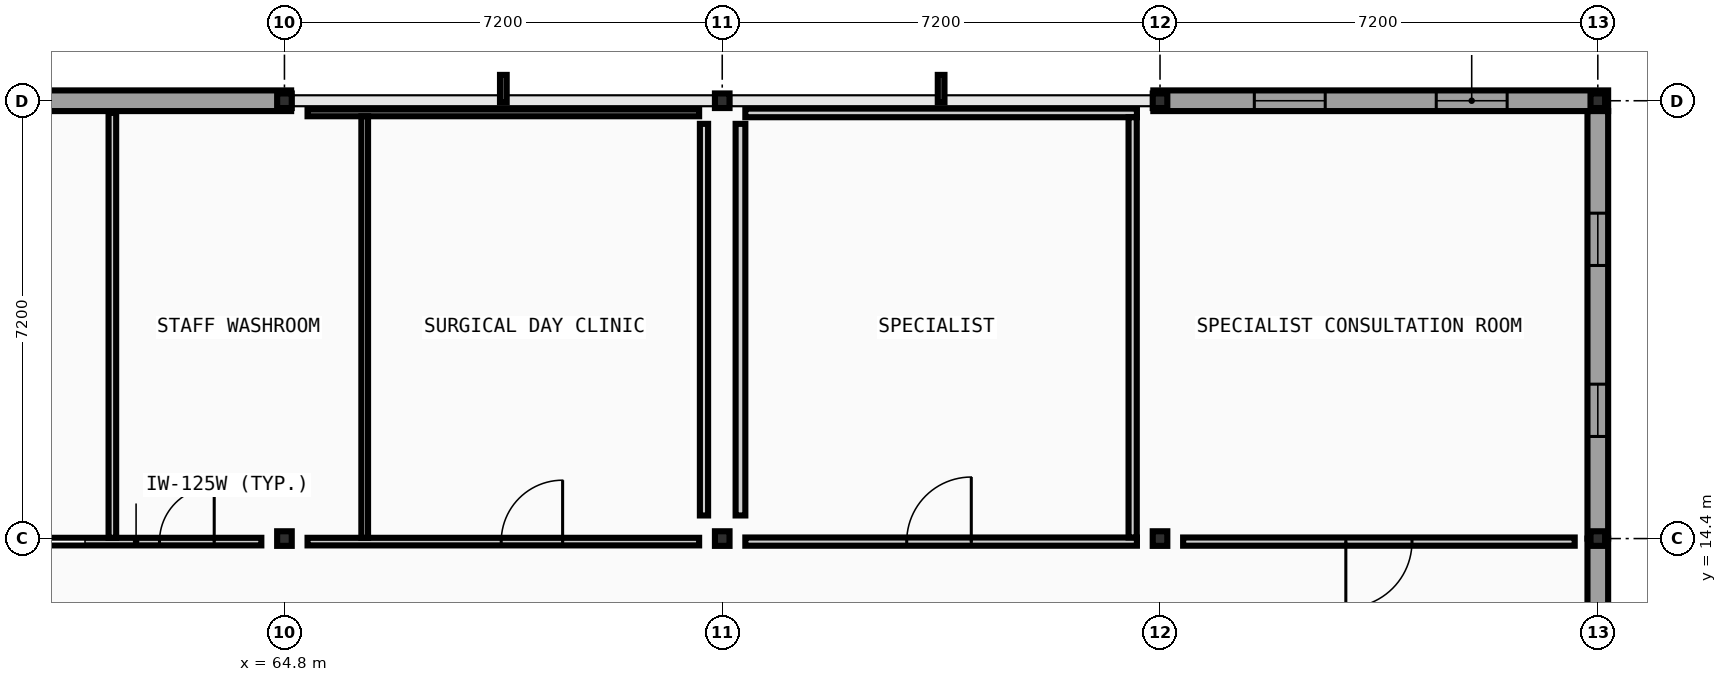
"""IFC4 building model, lengths in metres.
Left out: names, types, materials, properties, quantities, classifications, styles, units other than length and angle.
Written with IfcOpenShell. Run it as: python <this file> out.ifc"""

import sys

from ifc_helpers import new_model, si_unit, direction, frame, frame_2d, origin, origin_2d, place, context, subcontext, project, spatial, rectangle, i_section, extrude, element, fill, save


model = new_model("IFC4")
c1 = context("Model", 3, precision=1e-05, world=origin(), true_north=direction((0.0, 1.0)))
c2 = subcontext(c1, "Body", "Model", "MODEL_VIEW")
j1 = project(units=[si_unit("LENGTHUNIT", "METRE"), si_unit("PLANEANGLEUNIT", "RADIAN")], contexts=[c1])
p1 = place(None, origin())
s1 = spatial("IfcSite", under=j1, at=p1, CompositionType="ELEMENT")
p2 = place(p1, origin())
s2 = spatial("IfcBuilding", under=s1, at=p2, CompositionType="ELEMENT")
p3 = place(p2, frame((0.0, 0.0, 18.4)))
s3 = spatial("IfcBuildingStorey", under=s2, at=p3, CompositionType="ELEMENT", Elevation=18.4)
for number, where, z_axis, x_axis in (
    (1, (64.8, 14.4, 0.0), (0.0, 0.0, 1.0), (1.0, 0.0, 0.0)),
    (2, (64.8, 21.6, 0.0), (0.0, 0.0, 1.0), (1.0, 0.0, 0.0)),
    (3, (72.0, 14.4, 0.0), (0.0, 0.0, 1.0), (1.0, 0.0, 0.0)),
    (4, (72.0, 21.6, 0.0), (0.0, 0.0, 1.0), (1.0, 0.0, 0.0)),
    (5, (79.2, 14.4, 0.0), (0.0, 0.0, 1.0), (1.0, 0.0, 0.0)),
    (6, (79.2, 21.6, 0.0), (0.0, 0.0, 1.0), (1.0, 0.0, 0.0)),
    (7, (86.4, 14.4, 0.0), (0.0, 0.0, 1.0), (1.0, 0.0, 0.0)),
    (8, (86.4, 21.6, 0.0), (0.0, 0.0, 1.0), (1.0, 0.0, 0.0)),
):
    element("IfcColumn", number, at=place(p3, frame(where, z_axis=z_axis, x_axis=x_axis)), inside=s3, PredefinedType="COLUMN", context=c2, shape_type="SweptSolid", body=[
        extrude(i_section(OverallWidth=0.24, OverallDepth=0.24, WebThickness=0.01, FlangeThickness=0.017, FilletRadius=0.021, at=origin_2d()), origin(), (0.0, 0.0, 1.0), 4.4),
    ])
p4 = place(p3, frame((64.91, 21.6, 0.0), z_axis=(0.0, 0.0, 1.0), x_axis=(-1.0, 0.0, 0.0)))
e9 = element("IfcWall", 9, at=p4, inside=s3, PredefinedType="STANDARD", context=c2, shape_type="SweptSolid", body=[
    extrude(rectangle(XDim=6.42, YDim=0.34, at=frame_2d((3.21, 0.0))), origin(), (0.0, 0.0, 1.0), 4.035),
])
p5 = place(p3, frame((86.57, 21.6, 0.0), z_axis=(0.0, 0.0, 1.0), x_axis=(-1.0, 0.0, 0.0)))
e10 = element("IfcWall", 10, at=p5, inside=s3, PredefinedType="STANDARD", context=c2, shape_type="SweptSolid", body=[
    extrude(rectangle(XDim=7.48, YDim=0.34, at=frame_2d((3.74, 0.0))), origin(), (0.0, 0.0, 1.0), 4.035),
])
p6 = place(p5, frame((1.661, 0.0, 0.95)))
e11 = element("IfcOpeningElement", 11, at=p6, cuts=e10, PredefinedType="OPENING", context=c2, shape_type="SweptSolid", body=[
    extrude(rectangle(XDim=1.166, YDim=1.368, at=frame_2d((0.583, 0.684))), frame((0.0, 0.18, 0.0), z_axis=(0.0, -1.0, 0.0), x_axis=(1.0, 0.0, 0.0)), (0.0, 0.0, 1.0), 0.36),
])
p7 = place(p5, frame((4.653, 0.0, 0.95)))
e12 = element("IfcOpeningElement", 12, at=p7, cuts=e10, PredefinedType="OPENING", context=c2, shape_type="SweptSolid", body=[
    extrude(rectangle(XDim=1.166, YDim=1.368, at=frame_2d((0.583, 0.684))), frame((0.0, 0.18, 0.0), z_axis=(0.0, -1.0, 0.0), x_axis=(1.0, 0.0, 0.0)), (0.0, 0.0, 1.0), 0.36),
])
p8 = place(p3, frame((86.4, 8.9, 0.0), z_axis=(0.0, 0.0, 1.0), x_axis=(0.0, 1.0, 0.0)))
e13 = element("IfcWall", 13, at=p8, inside=s3, PredefinedType="STANDARD", context=c2, shape_type="SweptSolid", body=[
    extrude(rectangle(XDim=5.5, YDim=0.34, at=frame_2d((2.75, 0.0))), origin(), (0.0, 0.0, 1.0), 4.11),
])
p9 = place(p3, frame((86.4, 14.4, 0.0), z_axis=(0.0, 0.0, 1.0), x_axis=(0.0, 1.0, 0.0)))
e14 = element("IfcWall", 14, at=p9, inside=s3, PredefinedType="STANDARD", context=c2, shape_type="SweptSolid", body=[
    extrude(rectangle(XDim=7.03, YDim=0.34, at=frame_2d((3.515, 0.0))), origin(), (0.0, 0.0, 1.0), 4.11),
])
p10 = place(p9, frame((1.679, 0.0, 0.95)))
e15 = element("IfcOpeningElement", 15, at=p10, cuts=e14, PredefinedType="OPENING", context=c2, shape_type="SweptSolid", body=[
    extrude(rectangle(XDim=0.86, YDim=1.404, at=frame_2d((0.43, 0.702))), frame((0.0, 0.18, 0.0), z_axis=(0.0, -1.0, 0.0), x_axis=(1.0, 0.0, 0.0)), (0.0, 0.0, 1.0), 0.36),
])
p11 = place(p9, frame((4.491, 0.0, 0.95)))
e16 = element("IfcOpeningElement", 16, at=p11, cuts=e14, PredefinedType="OPENING", context=c2, shape_type="SweptSolid", body=[
    extrude(rectangle(XDim=0.86, YDim=1.404, at=frame_2d((0.43, 0.702))), frame((0.0, 0.18, 0.0), z_axis=(0.0, -1.0, 0.0), x_axis=(1.0, 0.0, 0.0)), (0.0, 0.0, 1.0), 0.36),
])
p12 = place(p3, frame((58.7, 14.35, 0.0), z_axis=(0.0, 0.0, 1.0), x_axis=(1.0, 0.0, 0.0)))
e17 = element("IfcWall", 17, at=p12, inside=s3, PredefinedType="PARTITIONING", context=c2, shape_type="SweptSolid", body=[
    extrude(rectangle(XDim=5.72, YDim=0.125, at=frame_2d((2.86, 0.0))), origin(), (0.0, 0.0, 1.0), 4.035),
])
p13 = place(p12, frame((1.82, 0.0, 0.0)))
e18 = element("IfcOpeningElement", 18, at=p13, cuts=e17, PredefinedType="OPENING", context=c2, shape_type="SweptSolid", body=[
    extrude(rectangle(XDim=1.0, YDim=2.1, at=frame_2d((0.5, 1.05))), frame((0.0, 0.073, 0.0), z_axis=(0.0, -1.0, 0.0), x_axis=(1.0, 0.0, 0.0)), (0.0, 0.0, 1.0), 0.145),
])
p14 = place(p12, frame((4.045, 0.0, 0.0)))
e19 = element("IfcOpeningElement", 19, at=p14, cuts=e17, PredefinedType="OPENING", context=c2, shape_type="SweptSolid", body=[
    extrude(rectangle(XDim=0.9, YDim=2.1, at=frame_2d((0.45, 1.05))), frame((0.0, 0.073, 0.0), z_axis=(0.0, -1.0, 0.0), x_axis=(1.0, 0.0, 0.0)), (0.0, 0.0, 1.0), 0.145),
])
p15 = place(p3, frame((65.18, 14.35, 0.0), z_axis=(0.0, 0.0, 1.0), x_axis=(1.0, 0.0, 0.0)))
e20 = element("IfcWall", 20, at=p15, inside=s3, PredefinedType="PARTITIONING", context=c2, shape_type="SweptSolid", body=[
    extrude(rectangle(XDim=6.44, YDim=0.125, at=frame_2d((3.22, 0.0))), origin(), (0.0, 0.0, 1.0), 4.035),
])
p16 = place(p15, frame((3.185, 0.0, 0.0)))
e21 = element("IfcOpeningElement", 21, at=p16, cuts=e20, PredefinedType="OPENING", context=c2, shape_type="SweptSolid", body=[
    extrude(rectangle(XDim=1.01, YDim=2.068, at=frame_2d((0.505, 1.034))), frame((0.0, 0.073, 0.0), z_axis=(0.0, -1.0, 0.0), x_axis=(1.0, 0.0, 0.0)), (0.0, 0.0, 1.0), 0.145),
])
p17 = place(p3, frame((72.38, 14.35, 0.0), z_axis=(0.0, 0.0, 1.0), x_axis=(1.0, 0.0, 0.0)))
e22 = element("IfcWall", 22, at=p17, inside=s3, PredefinedType="PARTITIONING", context=c2, shape_type="SweptSolid", body=[
    extrude(rectangle(XDim=6.44, YDim=0.135, at=frame_2d((3.22, 0.0))), origin(), (0.0, 0.0, 1.0), 4.035),
])
p18 = place(p17, frame((2.654, 0.0, 0.0)))
e23 = element("IfcOpeningElement", 23, at=p18, cuts=e22, PredefinedType="OPENING", context=c2, shape_type="SweptSolid", body=[
    extrude(rectangle(XDim=1.062, YDim=2.068, at=frame_2d((0.531, 1.034))), frame((0.0, 0.078, 0.0), z_axis=(0.0, -1.0, 0.0), x_axis=(1.0, 0.0, 0.0)), (0.0, 0.0, 1.0), 0.155),
])
p19 = place(p3, frame((79.58, 14.35, 0.0), z_axis=(0.0, 0.0, 1.0), x_axis=(1.0, 0.0, 0.0)))
e24 = element("IfcWall", 24, at=p19, inside=s3, PredefinedType="PARTITIONING", context=c2, shape_type="SweptSolid", body=[
    extrude(rectangle(XDim=6.44, YDim=0.135, at=frame_2d((3.22, 0.0))), origin(), (0.0, 0.0, 1.0), 4.035),
])
p20 = place(p19, frame((2.676, 0.0, 0.0)))
e25 = element("IfcOpeningElement", 25, at=p20, cuts=e24, PredefinedType="OPENING", context=c2, shape_type="SweptSolid", body=[
    extrude(rectangle(XDim=1.088, YDim=2.068, at=frame_2d((0.544, 1.034))), frame((0.0, 0.078, 0.0), z_axis=(0.0, -1.0, 0.0), x_axis=(1.0, 0.0, 0.0)), (0.0, 0.0, 1.0), 0.155),
])
p21 = place(p3, frame((65.18, 21.4, 0.0), z_axis=(0.0, 0.0, 1.0), x_axis=(1.0, 0.0, 0.0)))
e26 = element("IfcWall", 26, at=p21, inside=s3, PredefinedType="PARTITIONING", context=c2, shape_type="SweptSolid", body=[
    extrude(rectangle(XDim=6.44, YDim=0.11, at=frame_2d((3.22, 0.0))), origin(), (0.0, 0.0, 1.0), 4.035),
])
p22 = place(p3, frame((72.38, 21.4, 0.0), z_axis=(0.0, 0.0, 1.0), x_axis=(1.0, 0.0, 0.0)))
e27 = element("IfcWall", 27, at=p22, inside=s3, PredefinedType="PARTITIONING", context=c2, shape_type="SweptSolid", body=[
    extrude(rectangle(XDim=6.44, YDim=0.142, at=frame_2d((3.22, 0.0))), origin(), (0.0, 0.0, 1.0), 4.035),
])
p23 = place(p3, frame((61.97, 14.413, 0.0), z_axis=(0.0, 0.0, 1.0), x_axis=(0.0, 1.0, 0.0)))
e28 = element("IfcWall", 28, at=p23, inside=s3, PredefinedType="PARTITIONING", context=c2, shape_type="SweptSolid", body=[
    extrude(rectangle(XDim=6.987, YDim=0.125, at=frame_2d((3.494, 0.0))), origin(), (0.0, 0.0, 1.0), 4.18),
])
p24 = place(p3, frame((66.12, 14.413, 0.0), z_axis=(0.0, 0.0, 1.0), x_axis=(0.0, 1.0, 0.0)))
e29 = element("IfcWall", 29, at=p24, inside=s3, PredefinedType="PARTITIONING", context=c2, shape_type="SweptSolid", body=[
    extrude(rectangle(XDim=6.932, YDim=0.11, at=frame_2d((3.466, 0.0))), origin(), (0.0, 0.0, 1.0), 4.18),
])
p25 = place(p3, frame((71.7, 14.78, 0.0), z_axis=(0.0, 0.0, 1.0), x_axis=(0.0, 1.0, 0.0)))
e30 = element("IfcWall", 30, at=p25, inside=s3, PredefinedType="PARTITIONING", context=c2, shape_type="SweptSolid", body=[
    extrude(rectangle(XDim=6.44, YDim=0.135, at=frame_2d((3.22, 0.0))), origin(), (0.0, 0.0, 1.0), 4.18),
])
p26 = place(p3, frame((72.3, 14.78, 0.0), z_axis=(0.0, 0.0, 1.0), x_axis=(0.0, 1.0, 0.0)))
e31 = element("IfcWall", 31, at=p26, inside=s3, PredefinedType="PARTITIONING", context=c2, shape_type="SweptSolid", body=[
    extrude(rectangle(XDim=6.44, YDim=0.16, at=frame_2d((3.22, 0.0))), origin(), (0.0, 0.0, 1.0), 4.18),
])
p27 = place(p3, frame((78.75, 14.417, 0.0), z_axis=(0.0, 0.0, 1.0), x_axis=(0.0, 1.0, 0.0)))
e32 = element("IfcWall", 32, at=p27, inside=s3, PredefinedType="PARTITIONING", context=c2, shape_type="SweptSolid", body=[
    extrude(rectangle(XDim=6.912, YDim=0.135, at=frame_2d((3.456, 0.0))), origin(), (0.0, 0.0, 1.0), 4.18),
])
p28 = place(p6, origin())
e33 = element("IfcWindow", 33, at=p28, inside=s3, PartitioningType="SINGLE_PANEL", PredefinedType="WINDOW", context=c2, shape_type="SweptSolid", body=[
    extrude(rectangle(XDim=1.166, YDim=1.368, at=frame_2d((0.583, 0.684))), frame((0.0, 0.03, 0.0), z_axis=(0.0, -1.0, 0.0), x_axis=(1.0, 0.0, 0.0)), (0.0, 0.0, 1.0), 0.06),
])
fill(e11, e33)
p29 = place(p7, origin())
e34 = element("IfcWindow", 34, at=p29, inside=s3, PartitioningType="SINGLE_PANEL", PredefinedType="WINDOW", context=c2, shape_type="SweptSolid", body=[
    extrude(rectangle(XDim=1.166, YDim=1.368, at=frame_2d((0.583, 0.684))), frame((0.0, 0.03, 0.0), z_axis=(0.0, -1.0, 0.0), x_axis=(1.0, 0.0, 0.0)), (0.0, 0.0, 1.0), 0.06),
])
fill(e12, e34)
p30 = place(p10, origin())
e35 = element("IfcWindow", 35, at=p30, inside=s3, PartitioningType="SINGLE_PANEL", PredefinedType="WINDOW", context=c2, shape_type="SweptSolid", body=[
    extrude(rectangle(XDim=0.86, YDim=1.404, at=frame_2d((0.43, 0.702))), frame((0.0, 0.03, 0.0), z_axis=(0.0, -1.0, 0.0), x_axis=(1.0, 0.0, 0.0)), (0.0, 0.0, 1.0), 0.06),
])
fill(e15, e35)
p31 = place(p11, origin())
e36 = element("IfcWindow", 36, at=p31, inside=s3, PartitioningType="SINGLE_PANEL", PredefinedType="WINDOW", context=c2, shape_type="SweptSolid", body=[
    extrude(rectangle(XDim=0.86, YDim=1.404, at=frame_2d((0.43, 0.702))), frame((0.0, 0.03, 0.0), z_axis=(0.0, -1.0, 0.0), x_axis=(1.0, 0.0, 0.0)), (0.0, 0.0, 1.0), 0.06),
])
fill(e16, e36)
p32 = place(p13, frame((1.0, 0.0, 0.0), z_axis=(0.0, 0.0, 1.0), x_axis=(-1.0, 0.0, 0.0)))
e37 = element("IfcDoor", 37, at=p32, inside=s3, OperationType="SLIDING_TO_LEFT", PredefinedType="DOOR", context=c2, shape_type="SweptSolid", body=[
    extrude(rectangle(XDim=1.0, YDim=2.1, at=frame_2d((0.5, 1.05))), frame((0.0, 0.025, 0.0), z_axis=(0.0, -1.0, 0.0), x_axis=(1.0, 0.0, 0.0)), (0.0, 0.0, 1.0), 0.05),
])
fill(e18, e37)
p33 = place(p14, frame((0.9, 0.0, 0.0), z_axis=(0.0, 0.0, 1.0), x_axis=(-1.0, 0.0, 0.0)))
e38 = element("IfcDoor", 38, at=p33, inside=s3, OperationType="SINGLE_SWING_RIGHT", PredefinedType="DOOR", context=c2, shape_type="SweptSolid", body=[
    extrude(rectangle(XDim=0.9, YDim=2.1, at=frame_2d((0.45, 1.05))), frame((0.0, 0.025, 0.0), z_axis=(0.0, -1.0, 0.0), x_axis=(1.0, 0.0, 0.0)), (0.0, 0.0, 1.0), 0.05),
])
fill(e19, e38)
p34 = place(p16, frame((1.01, 0.0, 0.0), z_axis=(0.0, 0.0, 1.0), x_axis=(-1.0, 0.0, 0.0)))
e39 = element("IfcDoor", 39, at=p34, inside=s3, OperationType="SINGLE_SWING_RIGHT", PredefinedType="DOOR", context=c2, shape_type="SweptSolid", body=[
    extrude(rectangle(XDim=1.01, YDim=2.068, at=frame_2d((0.505, 1.034))), frame((0.0, 0.025, 0.0), z_axis=(0.0, -1.0, 0.0), x_axis=(1.0, 0.0, 0.0)), (0.0, 0.0, 1.0), 0.05),
])
fill(e21, e39)
p35 = place(p18, frame((1.062, 0.0, 0.0), z_axis=(0.0, 0.0, 1.0), x_axis=(-1.0, 0.0, 0.0)))
e40 = element("IfcDoor", 40, at=p35, inside=s3, OperationType="SINGLE_SWING_RIGHT", PredefinedType="DOOR", context=c2, shape_type="SweptSolid", body=[
    extrude(rectangle(XDim=1.062, YDim=2.068, at=frame_2d((0.531, 1.034))), frame((0.0, 0.025, 0.0), z_axis=(0.0, -1.0, 0.0), x_axis=(1.0, 0.0, 0.0)), (0.0, 0.0, 1.0), 0.05),
])
fill(e23, e40)
p36 = place(p20, frame((1.088, 0.0, 0.0), z_axis=(0.0, 0.0, 1.0), x_axis=(-1.0, 0.0, 0.0)))
e41 = element("IfcDoor", 41, at=p36, inside=s3, OperationType="SINGLE_SWING_LEFT", PredefinedType="DOOR", context=c2, shape_type="SweptSolid", body=[
    extrude(rectangle(XDim=1.088, YDim=2.068, at=frame_2d((0.544, 1.034))), frame((0.0, 0.025, 0.0), z_axis=(0.0, -1.0, 0.0), x_axis=(1.0, 0.0, 0.0)), (0.0, 0.0, 1.0), 0.05),
])
fill(e25, e41)
save(model, sys.argv[1])
